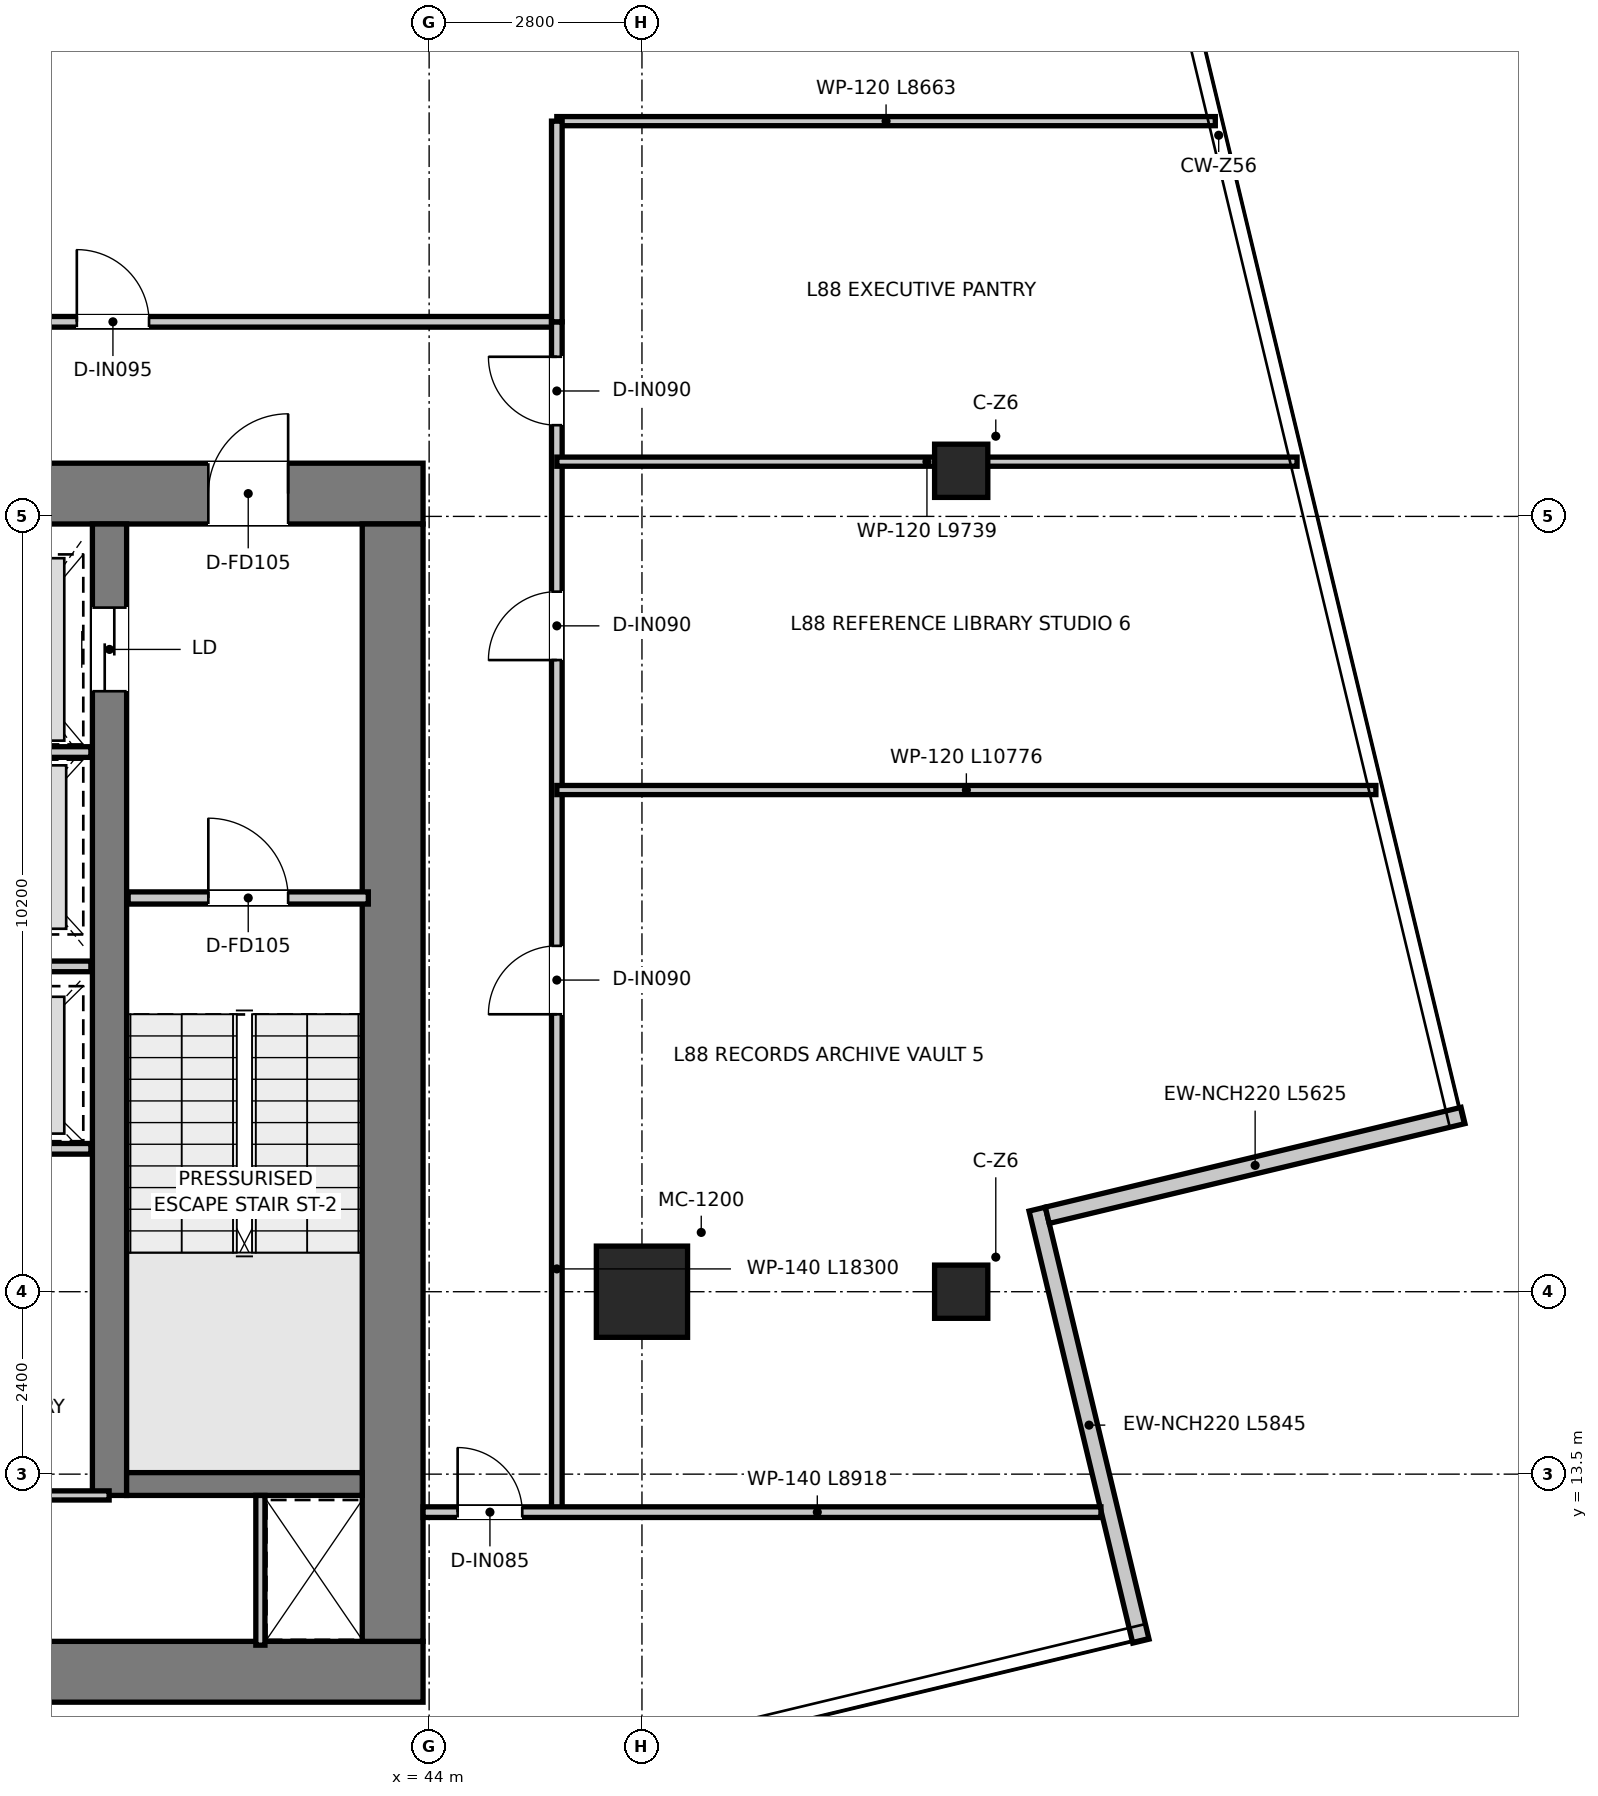
"""IFC4 building model, lengths in metres.
Left out: names, types, materials, properties, quantities, classifications, styles, units other than length and angle.
Written with IfcOpenShell. Run it as: python <this file> out.ifc"""

import sys

from ifc_helpers import new_model, si_unit, direction, frame, frame_2d, origin, origin_2d, place, context, subcontext, project, spatial, rectangle, extrude, source, transform, mapped, element, fill, save


model = new_model("IFC4")
c1 = context("Model", 3, precision=1e-05, world=origin(), true_north=direction((0.0, 1.0)))
c2 = subcontext(c1, "Body", "Model", "MODEL_VIEW")
j1 = project(units=[si_unit("LENGTHUNIT", "METRE"), si_unit("PLANEANGLEUNIT", "RADIAN")], contexts=[c1])
p1 = place(None, origin())
s1 = spatial("IfcSite", under=j1, at=p1, CompositionType="ELEMENT")
p2 = place(p1, origin())
s2 = spatial("IfcBuilding", under=s1, at=p2, CompositionType="ELEMENT")
p3 = place(p2, frame((0.0, 0.0, 359.3)))
s3 = spatial("IfcBuildingStorey", under=s2, at=p3, CompositionType="ELEMENT", Elevation=359.3)
p4 = place(p3, frame((28.08, 10.9, 0.0), z_axis=(0.0, 0.0, 1.0), x_axis=(1.0, 0.0, 0.0)))
e1 = element("IfcWall", 1, at=p4, inside=s3, PredefinedType="SHEAR", context=c2, shape_type="SweptSolid", body=[
    extrude(rectangle(XDim=15.84, YDim=0.8, at=frame_2d((7.92, 0.0))), origin(), (0.0, 0.0, 1.0), 3.95),
])
p5 = place(p3, frame((28.08, 26.4, 0.0), z_axis=(0.0, 0.0, 1.0), x_axis=(1.0, 0.0, 0.0)))
e2 = element("IfcWall", 2, at=p5, inside=s3, PredefinedType="SHEAR", context=c2, shape_type="SweptSolid", body=[
    extrude(rectangle(XDim=15.84, YDim=0.8, at=frame_2d((7.92, 0.0))), origin(), (0.0, 0.0, 1.0), 3.95),
])
p6 = place(p5, frame((7.22, 0.0, 0.0)))
e3 = element("IfcOpeningElement", 3, at=p6, cuts=e2, PredefinedType="OPENING", context=c2, shape_type="SweptSolid", body=[
    extrude(rectangle(XDim=1.4, YDim=2.2, at=frame_2d((0.7, 1.1))), frame((0.0, 0.41, 0.0), z_axis=(0.0, -1.0, 0.0), x_axis=(1.0, 0.0, 0.0)), (0.0, 0.0, 1.0), 0.82),
])
p7 = place(p5, frame((1.775, 0.0, 0.0)))
e4 = element("IfcOpeningElement", 4, at=p7, cuts=e2, PredefinedType="OPENING", context=c2, shape_type="SweptSolid", body=[
    extrude(rectangle(XDim=1.05, YDim=2.1, at=frame_2d((0.525, 1.05))), frame((0.0, 0.41, 0.0), z_axis=(0.0, -1.0, 0.0), x_axis=(1.0, 0.0, 0.0)), (0.0, 0.0, 1.0), 0.82),
])
p8 = place(p5, frame((13.015, 0.0, 0.0)))
e5 = element("IfcOpeningElement", 5, at=p8, cuts=e2, PredefinedType="OPENING", context=c2, shape_type="SweptSolid", body=[
    extrude(rectangle(XDim=1.05, YDim=2.1, at=frame_2d((0.525, 1.05))), frame((0.0, 0.41, 0.0), z_axis=(0.0, -1.0, 0.0), x_axis=(1.0, 0.0, 0.0)), (0.0, 0.0, 1.0), 0.82),
])
p9 = place(p3, frame((43.52, 11.3, 0.0), z_axis=(0.0, 0.0, 1.0), x_axis=(0.0, 1.0, 0.0)))
e6 = element("IfcWall", 6, at=p9, inside=s3, PredefinedType="SHEAR", context=c2, shape_type="SweptSolid", body=[
    extrude(rectangle(XDim=14.7, YDim=0.8, at=frame_2d((7.35, 0.0))), origin(), (0.0, 0.0, 1.0), 3.95),
])
p10 = place(p3, frame((39.795, 13.22, 0.0), z_axis=(0.0, 0.0, 1.0), x_axis=(0.0, 1.0, 0.0)))
e7 = element("IfcWall", 7, at=p10, inside=s3, PredefinedType="SHEAR", context=c2, shape_type="SweptSolid", body=[
    extrude(rectangle(XDim=12.78, YDim=0.45, at=frame_2d((6.39, 0.0))), origin(), (0.0, 0.0, 1.0), 3.95),
])
p11 = place(p10, frame((10.58, 0.0, 0.0)))
e8 = element("IfcOpeningElement", 8, at=p11, cuts=e7, PredefinedType="OPENING", context=c2, shape_type="SweptSolid", body=[
    extrude(rectangle(XDim=1.1, YDim=2.15, at=frame_2d((0.55, 1.075))), frame((0.0, 0.235, 0.0), z_axis=(0.0, -1.0, 0.0), x_axis=(1.0, 0.0, 0.0)), (0.0, 0.0, 1.0), 0.47),
])
p12 = place(p3, frame((40.02, 13.37, 0.0), z_axis=(0.0, 0.0, 1.0), x_axis=(1.0, 0.0, 0.0)))
e9 = element("IfcWall", 9, at=p12, inside=s3, PredefinedType="SHEAR", context=c2, shape_type="SweptSolid", body=[
    extrude(rectangle(XDim=3.1, YDim=0.3, at=frame_2d((1.55, 0.0))), origin(), (0.0, 0.0, 1.0), 3.95),
])
m1 = source(origin(), c2, "Body", "SweptSolid", [
    extrude(rectangle(XDim=1.2, YDim=1.2, at=origin_2d()), origin(), (0.0, 0.0, 1.0), 3.95),
])
p13 = place(p3, frame((46.8, 15.9, 0.0), z_axis=(0.0, 0.0, 1.0), x_axis=(1.0, 0.0, 0.0)))
e10 = element("IfcColumn", 10, at=p13, inside=s3, PredefinedType="USERDEFINED", context=c2, shape_type="MappedRepresentation", body=[
    mapped(m1, transform((0.0, 0.0, 0.0), x_axis=(1.0, 0.0, 0.0), y_axis=(0.0, 1.0, 0.0), z_axis=(0.0, 0.0, 1.0), scale=1.0)),
])
m2 = source(origin(), c2, "Body", "SweptSolid", [
    extrude(rectangle(XDim=0.7, YDim=0.7, at=origin_2d()), origin(), (0.0, 0.0, 1.0), 3.95),
])
for number, where, z_axis, x_axis in (
    (11, (51.0, 26.7, 0.0), (0.0, 0.0, 1.0), (1.0, 0.0, 0.0)),
    (12, (51.0, 15.9, 0.0), (0.0, 0.0, 1.0), (1.0, 0.0, 0.0)),
):
    element("IfcColumn", number, at=place(p3, frame(where, z_axis=z_axis, x_axis=x_axis)), inside=s3, PredefinedType="COLUMN", context=c2, shape_type="MappedRepresentation", body=[
        mapped(m2, transform((0.0, 0.0, 0.0), x_axis=(1.0, 0.0, 0.0), y_axis=(0.0, 1.0, 0.0), z_axis=(0.0, 0.0, 1.0), scale=1.0)),
    ])
p14 = place(p3, frame((53.364, 11.303, 0.0), z_axis=(0.0, 0.0, 1.0), x_axis=(-0.233453521986, 0.972367961768, 0.0)))
e13 = element("IfcWall", 13, at=p14, inside=s3, PredefinedType="ELEMENTEDWALL", context=c2, shape_type="SweptSolid", body=[
    extrude(rectangle(XDim=5.845, YDim=0.22, at=frame_2d((2.922, 0.0))), origin(), (0.0, 0.0, 1.0), 3.6),
])
p15 = place(p3, frame((52.132, 16.905, 0.0), z_axis=(0.0, 0.0, 1.0), x_axis=(0.972364840687, 0.233466521361, 0.0)))
e14 = element("IfcWall", 14, at=p15, inside=s3, PredefinedType="ELEMENTEDWALL", context=c2, shape_type="SweptSolid", body=[
    extrude(rectangle(XDim=5.625, YDim=0.22, at=frame_2d((2.812, 0.0))), origin(), (0.0, 0.0, 1.0), 3.6),
])
p16 = place(p3, frame((40.04, 21.08, 0.0), z_axis=(0.0, 0.0, 1.0), x_axis=(1.0, 0.0, 0.0)))
e15 = element("IfcWall", 15, at=p16, inside=s3, PredefinedType="PARTITIONING", context=c2, shape_type="SweptSolid", body=[
    extrude(rectangle(XDim=3.16, YDim=0.16, at=frame_2d((1.58, 0.0))), origin(), (0.0, 0.0, 1.0), 3.6),
])
p17 = place(p16, frame((1.055, 0.0, 0.0)))
e16 = element("IfcOpeningElement", 16, at=p17, cuts=e15, PredefinedType="OPENING", context=c2, shape_type="SweptSolid", body=[
    extrude(rectangle(XDim=1.05, YDim=2.1, at=frame_2d((0.525, 1.05))), frame((0.0, 0.09, 0.0), z_axis=(0.0, -1.0, 0.0), x_axis=(1.0, 0.0, 0.0)), (0.0, 0.0, 1.0), 0.18),
])
p18 = place(p3, frame((37.28, 23.0, 0.0), z_axis=(0.0, 0.0, 1.0), x_axis=(1.0, 0.0, 0.0)))
e17 = element("IfcWall", 17, at=p18, inside=s3, PredefinedType="PARTITIONING", context=c2, shape_type="SweptSolid", body=[
    extrude(rectangle(XDim=2.27, YDim=0.14, at=frame_2d((1.135, 0.0))), origin(), (0.0, 0.0, 1.0), 2.75),
])
for number, where, z_axis, x_axis in (
    (18, (37.28, 17.78, 0.0), (0.0, 0.0, 1.0), (1.0, 0.0, 0.0)),
    (19, (37.28, 20.18, 0.0), (0.0, 0.0, 1.0), (1.0, 0.0, 0.0)),
):
    element("IfcWall", number, at=place(p3, frame(where, z_axis=z_axis, x_axis=x_axis)), inside=s3, PredefinedType="PARTITIONING", context=c2, shape_type="SweptSolid", body=[
        extrude(rectangle(XDim=2.27, YDim=0.14, at=frame_2d((1.135, 0.0))), origin(), (0.0, 0.0, 1.0), 3.6),
    ])
p19 = place(p3, frame((41.78, 11.25, 0.0), z_axis=(0.0, 0.0, 1.0), x_axis=(0.0, 1.0, 0.0)))
e20 = element("IfcWall", 20, at=p19, inside=s3, PredefinedType="PARTITIONING", context=c2, shape_type="SweptSolid", body=[
    extrude(rectangle(XDim=1.97, YDim=0.12, at=frame_2d((0.985, 0.0))), origin(), (0.0, 0.0, 1.0), 3.6),
])
p20 = place(p3, frame((32.21, 13.22, 0.0), z_axis=(0.0, 0.0, 1.0), x_axis=(1.0, 0.0, 0.0)))
e21 = element("IfcWall", 21, at=p20, inside=s3, PredefinedType="PARTITIONING", context=c2, shape_type="SweptSolid", body=[
    extrude(rectangle(XDim=7.58, YDim=0.12, at=frame_2d((3.79, 0.0))), origin(), (0.0, 0.0, 1.0), 3.6),
])
p21 = place(p20, frame((3.365, 0.0, 0.0)))
e22 = element("IfcOpeningElement", 22, at=p21, cuts=e21, PredefinedType="OPENING", context=c2, shape_type="SweptSolid", body=[
    extrude(rectangle(XDim=0.85, YDim=2.1, at=frame_2d((0.425, 1.05))), frame((0.0, 0.07, 0.0), z_axis=(0.0, -1.0, 0.0), x_axis=(1.0, 0.0, 0.0)), (0.0, 0.0, 1.0), 0.14),
])
p22 = place(p3, frame((26.32, 28.66, 0.0), z_axis=(0.0, 0.0, 1.0), x_axis=(1.0, 0.0, 0.0)))
e23 = element("IfcWall", 23, at=p22, inside=s3, PredefinedType="PARTITIONING", context=c2, shape_type="SweptSolid", body=[
    extrude(rectangle(XDim=19.36, YDim=0.14, at=frame_2d((9.68, 0.0))), origin(), (0.0, 0.0, 1.0), 3.11),
])
p23 = place(p22, frame((3.365, 0.0, 0.0)))
e24 = element("IfcOpeningElement", 24, at=p23, cuts=e23, PredefinedType="OPENING", context=c2, shape_type="SweptSolid", body=[
    extrude(rectangle(XDim=0.95, YDim=2.1, at=frame_2d((0.475, 1.05))), frame((0.0, 0.08, 0.0), z_axis=(0.0, -1.0, 0.0), x_axis=(1.0, 0.0, 0.0)), (0.0, 0.0, 1.0), 0.16),
])
p24 = place(p22, frame((13.045, 0.0, 0.0)))
e25 = element("IfcOpeningElement", 25, at=p24, cuts=e23, PredefinedType="OPENING", context=c2, shape_type="SweptSolid", body=[
    extrude(rectangle(XDim=0.95, YDim=2.1, at=frame_2d((0.475, 1.05))), frame((0.0, 0.08, 0.0), z_axis=(0.0, -1.0, 0.0), x_axis=(1.0, 0.0, 0.0)), (0.0, 0.0, 1.0), 0.16),
])
p25 = place(p3, frame((45.68, 13.0, 0.0), z_axis=(0.0, 0.0, 1.0), x_axis=(0.0, 1.0, 0.0)))
e26 = element("IfcWall", 26, at=p25, inside=s3, PredefinedType="PARTITIONING", context=c2, shape_type="SweptSolid", body=[
    extrude(rectangle(XDim=15.66, YDim=0.14, at=frame_2d((7.83, 0.0))), origin(), (0.0, 0.0, 1.0), 3.06),
])
p26 = place(p25, frame((14.3, 0.0, 0.0)))
e27 = element("IfcOpeningElement", 27, at=p26, cuts=e26, PredefinedType="OPENING", context=c2, shape_type="SweptSolid", body=[
    extrude(rectangle(XDim=0.9, YDim=2.1, at=frame_2d((0.45, 1.05))), frame((0.0, 0.08, 0.0), z_axis=(0.0, -1.0, 0.0), x_axis=(1.0, 0.0, 0.0)), (0.0, 0.0, 1.0), 0.16),
])
p27 = place(p25, frame((6.55, 0.0, 0.0)))
e28 = element("IfcOpeningElement", 28, at=p27, cuts=e26, PredefinedType="OPENING", context=c2, shape_type="SweptSolid", body=[
    extrude(rectangle(XDim=0.9, YDim=2.1, at=frame_2d((0.45, 1.05))), frame((0.0, 0.08, 0.0), z_axis=(0.0, -1.0, 0.0), x_axis=(1.0, 0.0, 0.0)), (0.0, 0.0, 1.0), 0.16),
])
p28 = place(p25, frame((11.21, 0.0, 0.0)))
e29 = element("IfcOpeningElement", 29, at=p28, cuts=e26, PredefinedType="OPENING", context=c2, shape_type="SweptSolid", body=[
    extrude(rectangle(XDim=0.9, YDim=2.1, at=frame_2d((0.45, 1.05))), frame((0.0, 0.08, 0.0), z_axis=(0.0, -1.0, 0.0), x_axis=(1.0, 0.0, 0.0)), (0.0, 0.0, 1.0), 0.16),
])
p29 = place(p3, frame((43.92, 13.0, 0.0), z_axis=(0.0, 0.0, 1.0), x_axis=(1.0, 0.0, 0.0)))
e30 = element("IfcWall", 30, at=p29, inside=s3, PredefinedType="PARTITIONING", context=c2, shape_type="SweptSolid", body=[
    extrude(rectangle(XDim=8.918, YDim=0.14, at=frame_2d((4.459, 0.0))), origin(), (0.0, 0.0, 1.0), 3.11),
])
p30 = place(p29, frame((0.455, 0.0, 0.0)))
e31 = element("IfcOpeningElement", 31, at=p30, cuts=e30, PredefinedType="OPENING", context=c2, shape_type="SweptSolid", body=[
    extrude(rectangle(XDim=0.85, YDim=2.1, at=frame_2d((0.425, 1.05))), frame((0.0, 0.08, 0.0), z_axis=(0.0, -1.0, 0.0), x_axis=(1.0, 0.0, 0.0)), (0.0, 0.0, 1.0), 0.16),
])
p31 = place(p3, frame((45.68, 26.82, 0.0), z_axis=(0.0, 0.0, 1.0), x_axis=(1.0, 0.0, 0.0)))
e32 = element("IfcWall", 32, at=p31, inside=s3, PredefinedType="PARTITIONING", context=c2, shape_type="SweptSolid", body=[
    extrude(rectangle(XDim=9.739, YDim=0.12, at=frame_2d((4.869, 0.0))), origin(), (0.0, 0.0, 1.0), 3.06),
])
p32 = place(p3, frame((45.68, 31.3, 0.0), z_axis=(0.0, 0.0, 1.0), x_axis=(1.0, 0.0, 0.0)))
e33 = element("IfcWall", 33, at=p32, inside=s3, PredefinedType="PARTITIONING", context=c2, shape_type="SweptSolid", body=[
    extrude(rectangle(XDim=8.663, YDim=0.12, at=frame_2d((4.332, 0.0))), origin(), (0.0, 0.0, 1.0), 3.06),
])
p33 = place(p3, frame((45.68, 28.66, 0.0), z_axis=(0.0, 0.0, 1.0), x_axis=(0.0, 1.0, 0.0)))
e34 = element("IfcWall", 34, at=p33, inside=s3, PredefinedType="PARTITIONING", context=c2, shape_type="SweptSolid", body=[
    extrude(rectangle(XDim=2.64, YDim=0.14, at=frame_2d((1.32, 0.0))), origin(), (0.0, 0.0, 1.0), 3.36),
])
p34 = place(p3, frame((45.68, 22.5, 0.0), z_axis=(0.0, 0.0, 1.0), x_axis=(1.0, 0.0, 0.0)))
e35 = element("IfcWall", 35, at=p34, inside=s3, PredefinedType="PARTITIONING", context=c2, shape_type="SweptSolid", body=[
    extrude(rectangle(XDim=10.776, YDim=0.12, at=frame_2d((5.388, 0.0))), origin(), (0.0, 0.0, 1.0), 3.06),
])
p35 = place(p17, origin())
e36 = element("IfcDoor", 36, at=p35, inside=s3, OperationType="SINGLE_SWING_LEFT", PredefinedType="DOOR", context=c2, shape_type="SweptSolid", body=[
    extrude(rectangle(XDim=1.05, YDim=2.1, at=frame_2d((0.525, 1.05))), frame((0.0, 0.025, 0.0), z_axis=(0.0, -1.0, 0.0), x_axis=(1.0, 0.0, 0.0)), (0.0, 0.0, 1.0), 0.05),
])
fill(e16, e36)
p36 = place(p8, origin())
e37 = element("IfcDoor", 37, at=p36, inside=s3, OperationType="SINGLE_SWING_RIGHT", PredefinedType="DOOR", context=c2, shape_type="SweptSolid", body=[
    extrude(rectangle(XDim=1.05, YDim=2.1, at=frame_2d((0.525, 1.05))), frame((0.0, 0.025, 0.0), z_axis=(0.0, -1.0, 0.0), x_axis=(1.0, 0.0, 0.0)), (0.0, 0.0, 1.0), 0.05),
])
fill(e5, e37)
p37 = place(p11, origin())
e38 = element("IfcDoor", 38, at=p37, inside=s3, OperationType="DOUBLE_DOOR_SLIDING", PredefinedType="DOOR", context=c2, shape_type="SweptSolid", body=[
    extrude(rectangle(XDim=1.1, YDim=2.15, at=frame_2d((0.55, 1.075))), frame((0.0, 0.025, 0.0), z_axis=(0.0, -1.0, 0.0), x_axis=(1.0, 0.0, 0.0)), (0.0, 0.0, 1.0), 0.05),
])
fill(e8, e38)
p38 = place(p26, origin())
e39 = element("IfcDoor", 39, at=p38, inside=s3, OperationType="SINGLE_SWING_RIGHT", PredefinedType="DOOR", context=c2, shape_type="SweptSolid", body=[
    extrude(rectangle(XDim=0.9, YDim=2.1, at=frame_2d((0.45, 1.05))), frame((0.0, 0.025, 0.0), z_axis=(0.0, -1.0, 0.0), x_axis=(1.0, 0.0, 0.0)), (0.0, 0.0, 1.0), 0.05),
])
fill(e27, e39)
p39 = place(p24, origin())
e40 = element("IfcDoor", 40, at=p39, inside=s3, OperationType="SINGLE_SWING_LEFT", PredefinedType="DOOR", context=c2, shape_type="SweptSolid", body=[
    extrude(rectangle(XDim=0.95, YDim=2.1, at=frame_2d((0.475, 1.05))), frame((0.0, 0.025, 0.0), z_axis=(0.0, -1.0, 0.0), x_axis=(1.0, 0.0, 0.0)), (0.0, 0.0, 1.0), 0.05),
])
fill(e25, e40)
p40 = place(p27, origin())
e41 = element("IfcDoor", 41, at=p40, inside=s3, OperationType="SINGLE_SWING_LEFT", PredefinedType="DOOR", context=c2, shape_type="SweptSolid", body=[
    extrude(rectangle(XDim=0.9, YDim=2.1, at=frame_2d((0.45, 1.05))), frame((0.0, 0.025, 0.0), z_axis=(0.0, -1.0, 0.0), x_axis=(1.0, 0.0, 0.0)), (0.0, 0.0, 1.0), 0.05),
])
fill(e28, e41)
p41 = place(p28, origin())
e42 = element("IfcDoor", 42, at=p41, inside=s3, OperationType="SINGLE_SWING_LEFT", PredefinedType="DOOR", context=c2, shape_type="SweptSolid", body=[
    extrude(rectangle(XDim=0.9, YDim=2.1, at=frame_2d((0.45, 1.05))), frame((0.0, 0.025, 0.0), z_axis=(0.0, -1.0, 0.0), x_axis=(1.0, 0.0, 0.0)), (0.0, 0.0, 1.0), 0.05),
])
fill(e29, e42)
p42 = place(p30, origin())
e43 = element("IfcDoor", 43, at=p42, inside=s3, OperationType="SINGLE_SWING_LEFT", PredefinedType="DOOR", context=c2, shape_type="SweptSolid", body=[
    extrude(rectangle(XDim=0.85, YDim=2.1, at=frame_2d((0.425, 1.05))), frame((0.0, 0.025, 0.0), z_axis=(0.0, -1.0, 0.0), x_axis=(1.0, 0.0, 0.0)), (0.0, 0.0, 1.0), 0.05),
])
fill(e31, e43)
save(model, sys.argv[1])
